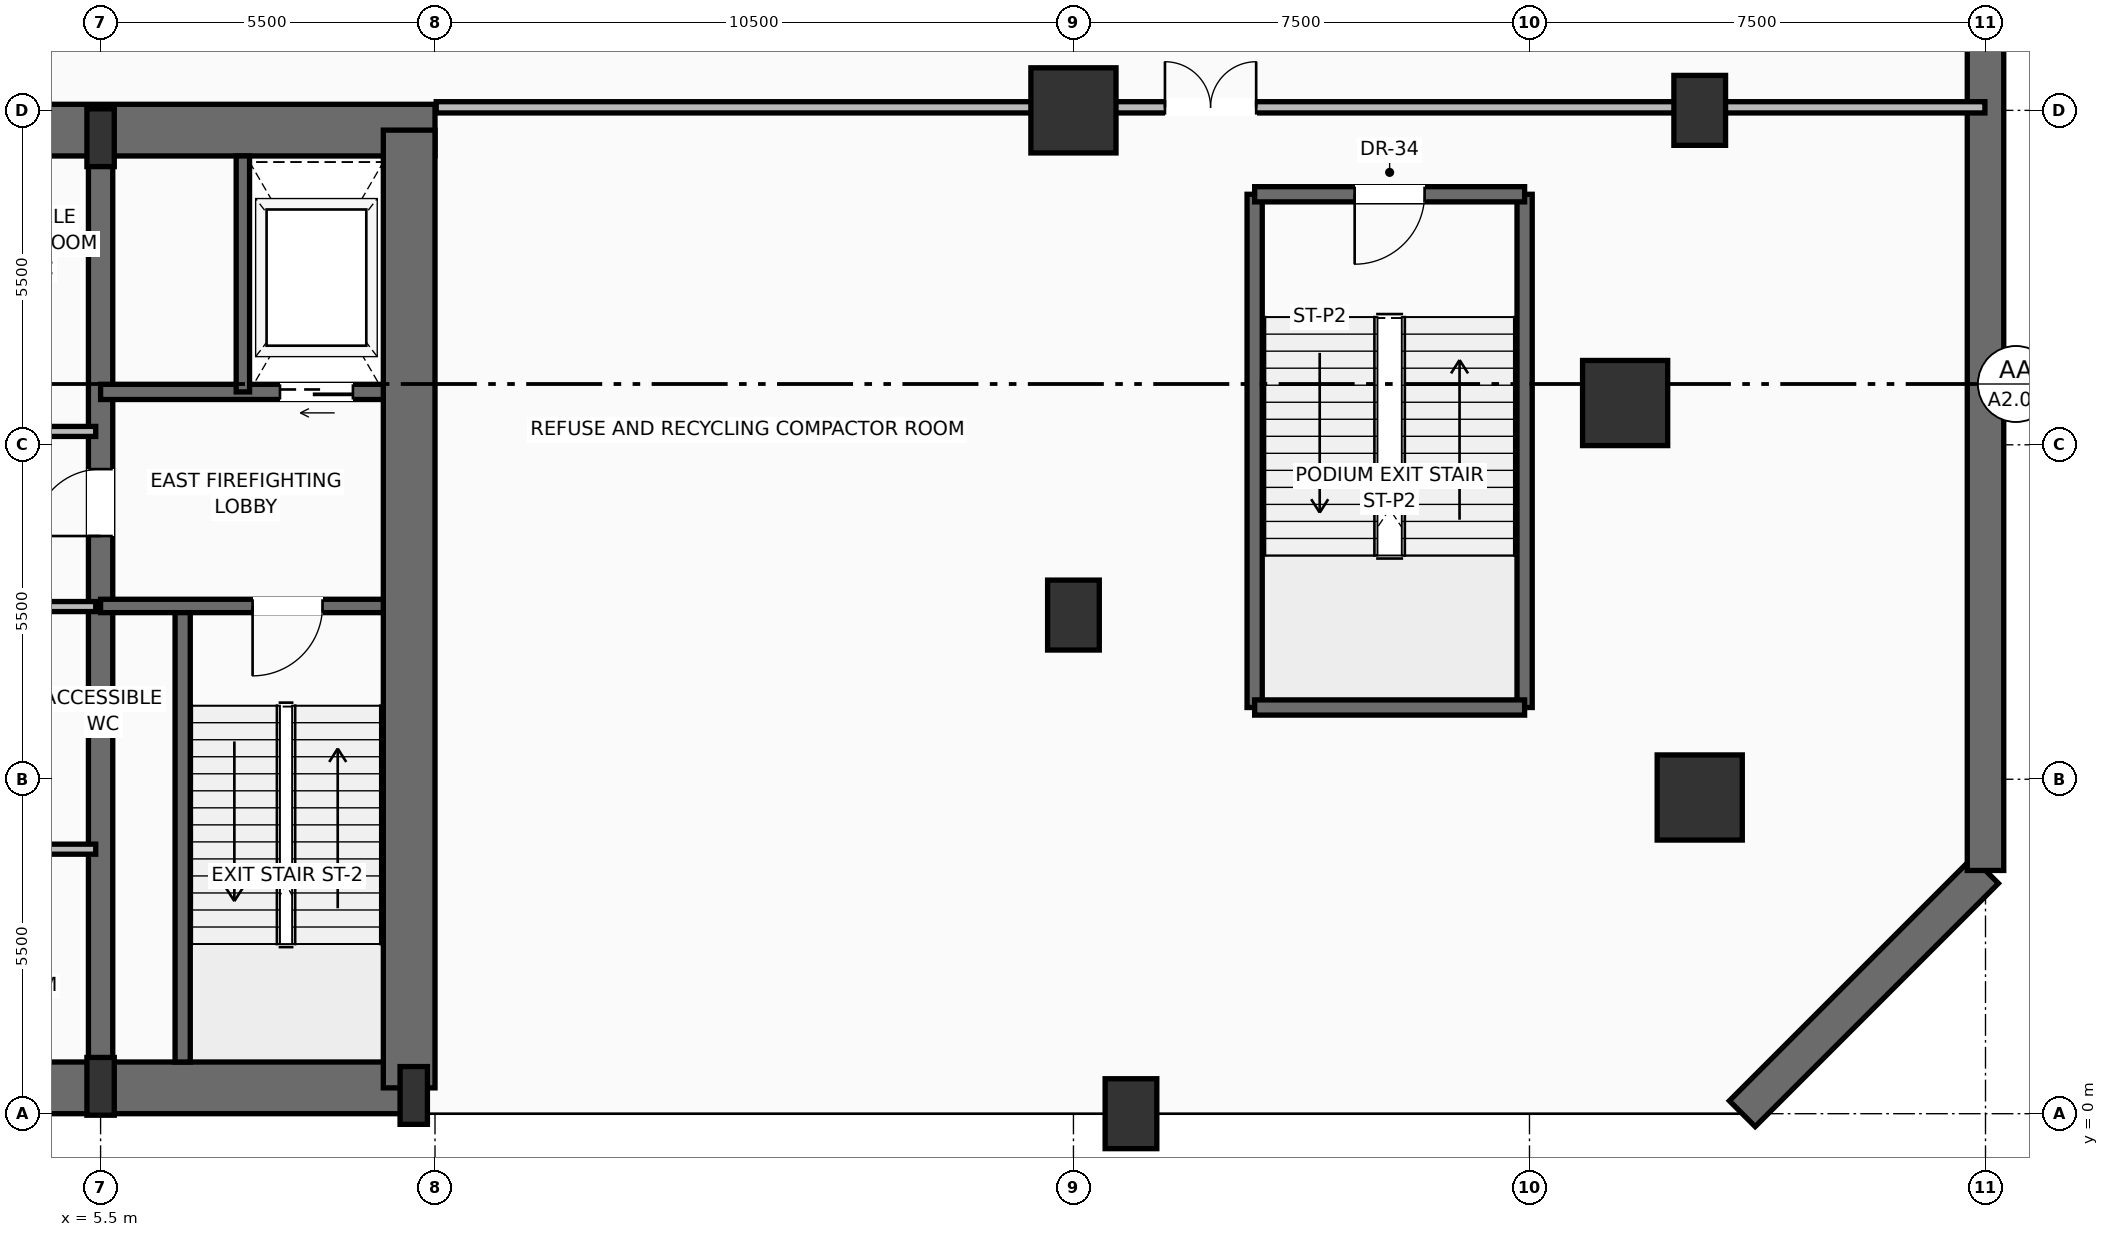
"""IFC4 building model, lengths in metres.
Left out: names, types, materials, properties, quantities, classifications, styles, units other than length and angle.
Written with IfcOpenShell. Run it as: python <this file> out.ifc"""

import sys

from ifc_helpers import new_model, si_unit, direction, frame, frame_2d, origin, origin_2d, place, context, subcontext, project, spatial, rectangle, hollow_rectangle, extrude, source, transform, mapped, element, fill, save


model = new_model("IFC4")
c1 = context("Model", 3, precision=1e-05, world=origin(), true_north=direction((0.0, 1.0)))
c2 = subcontext(c1, "Body", "Model", "MODEL_VIEW")
j1 = project(units=[si_unit("LENGTHUNIT", "METRE"), si_unit("PLANEANGLEUNIT", "RADIAN")], contexts=[c1])
p1 = place(None, origin())
s1 = spatial("IfcSite", under=j1, at=p1, CompositionType="ELEMENT")
p2 = place(p1, origin())
s2 = spatial("IfcBuilding", under=s1, at=p2, CompositionType="ELEMENT")
p3 = place(p2, frame((0.0, 0.0, -5.0)))
s3 = spatial("IfcBuildingStorey", under=s2, at=p3, CompositionType="ELEMENT", Elevation=-5.0)
p4 = place(p3, frame((32.5, 0.0, 0.0), z_axis=(0.0, 0.0, 1.0), x_axis=(0.707106781187, 0.707106781187, 0.0)))
e1 = element("IfcWall", 1, at=p4, inside=s3, PredefinedType="SOLIDWALL", context=c2, shape_type="SweptSolid", body=[
    extrude(rectangle(XDim=5.657, YDim=0.6, at=frame_2d((2.828, 0.0))), origin(), (0.0, 0.0, 1.0), 4.64),
])
p5 = place(p3, frame((36.5, 4.0, 0.0), z_axis=(0.0, 0.0, 1.0), x_axis=(0.0, 1.0, 0.0)))
e2 = element("IfcWall", 2, at=p5, inside=s3, PredefinedType="SOLIDWALL", context=c2, shape_type="SweptSolid", body=[
    extrude(rectangle(XDim=42.0, YDim=0.6, at=frame_2d((21.0, 0.0))), origin(), (0.0, 0.0, 1.0), 4.64),
])
p6 = place(p3, frame((-10.65, 0.425, 0.0), z_axis=(0.0, 0.0, 1.0), x_axis=(1.0, 0.0, 0.0)))
e3 = element("IfcWall", 3, at=p6, inside=s3, PredefinedType="SHEAR", context=c2, shape_type="SweptSolid", body=[
    extrude(rectangle(XDim=21.3, YDim=0.85, at=frame_2d((10.65, 0.0))), origin(), (0.0, 0.0, 1.0), 4.64),
])
p7 = place(p3, frame((-11.0, 16.175, 0.0), z_axis=(0.0, 0.0, 1.0), x_axis=(1.0, 0.0, 0.0)))
e4 = element("IfcWall", 4, at=p7, inside=s3, PredefinedType="SHEAR", context=c2, shape_type="SweptSolid", body=[
    extrude(rectangle(XDim=22.0, YDim=0.85, at=frame_2d((11.0, 0.0))), origin(), (0.0, 0.0, 1.0), 4.64),
])
p8 = place(p7, frame((3.57, 0.0, 0.0)))
e5 = element("IfcOpeningElement", 5, at=p8, cuts=e4, PredefinedType="OPENING", context=c2, shape_type="SweptSolid", body=[
    extrude(rectangle(XDim=1.3, YDim=2.3, at=frame_2d((0.65, 1.15))), frame((0.0, 0.435, 0.0), z_axis=(0.0, -1.0, 0.0), x_axis=(1.0, 0.0, 0.0)), (0.0, 0.0, 1.0), 0.87),
])
p9 = place(p7, frame((10.0, 0.0, 0.0)))
e6 = element("IfcOpeningElement", 6, at=p9, cuts=e4, PredefinedType="OPENING", context=c2, shape_type="SweptSolid", body=[
    extrude(rectangle(XDim=2.0, YDim=2.4, at=frame_2d((1.0, 1.2))), frame((0.0, 0.435, 0.0), z_axis=(0.0, -1.0, 0.0), x_axis=(1.0, 0.0, 0.0)), (0.0, 0.0, 1.0), 0.87),
])
p10 = place(p3, frame((10.575, 0.425, 0.0), z_axis=(0.0, 0.0, 1.0), x_axis=(0.0, 1.0, 0.0)))
e7 = element("IfcWall", 7, at=p10, inside=s3, PredefinedType="SHEAR", context=c2, shape_type="SweptSolid", body=[
    extrude(rectangle(XDim=15.75, YDim=0.85, at=frame_2d((7.875, 0.0))), origin(), (0.0, 0.0, 1.0), 4.64),
])
p11 = place(p3, frame((5.5, 0.425, 0.0), z_axis=(0.0, 0.0, 1.0), x_axis=(0.0, 1.0, 0.0)))
e8 = element("IfcWall", 8, at=p11, inside=s3, PredefinedType="SHEAR", context=c2, shape_type="SweptSolid", body=[
    extrude(rectangle(XDim=15.75, YDim=0.4, at=frame_2d((7.875, 0.0))), origin(), (0.0, 0.0, 1.0), 4.64),
])
p12 = place(p11, frame((9.075, 0.0, 0.0)))
e9 = element("IfcOpeningElement", 9, at=p12, cuts=e8, PredefinedType="OPENING", context=c2, shape_type="SweptSolid", body=[
    extrude(rectangle(XDim=1.1, YDim=2.2, at=frame_2d((0.55, 1.1))), frame((0.0, 0.21, 0.0), z_axis=(0.0, -1.0, 0.0), x_axis=(1.0, 0.0, 0.0)), (0.0, 0.0, 1.0), 0.42),
])
m1 = source(origin(), c2, "Body", "SweptSolid", [
    extrude(rectangle(XDim=0.45, YDim=0.95, at=origin_2d()), origin(), (0.0, 0.0, 1.0), 5.0),
])
for number, where, z_axis, x_axis in (
    (10, (5.5, 0.45, 0.0), (0.0, 0.0, 1.0), (1.0, 0.0, 0.0)),
    (11, (10.65, 0.3, 0.0), (0.0, 0.0, 1.0), (1.0, 0.0, 0.0)),
    (12, (5.5, 16.05, 0.0), (0.0, 0.0, 1.0), (1.0, 0.0, 0.0)),
):
    element("IfcColumn", number, at=place(p3, frame(where, z_axis=z_axis, x_axis=x_axis)), inside=s3, PredefinedType="PILASTER", context=c2, shape_type="MappedRepresentation", body=[
        mapped(m1, transform((0.0, 0.0, 0.0), scale=1.0)),
    ])
m2 = source(origin(), c2, "Body", "SweptSolid", [
    extrude(rectangle(XDim=0.85, YDim=1.15, at=origin_2d()), origin(), (0.0, 0.0, 1.0), 5.0),
])
for number, where, z_axis, x_axis in (
    (13, (22.446, 0.0, 0.0), (0.0, 0.0, 1.0), (1.0, 0.0, 0.0)),
    (14, (21.5, 8.2, 0.0), (0.0, 0.0, 1.0), (1.0, 0.0, 0.0)),
    (15, (31.8, 16.5, 0.0), (0.0, 0.0, 1.0), (1.0, 0.0, 0.0)),
):
    element("IfcColumn", number, at=place(p3, frame(where, z_axis=z_axis, x_axis=x_axis)), inside=s3, PredefinedType="COLUMN", context=c2, shape_type="MappedRepresentation", body=[
        mapped(m2, transform((0.0, 0.0, 0.0), scale=1.0)),
    ])
m3 = source(origin(), c2, "Body", "SweptSolid", [
    extrude(hollow_rectangle(XDim=1.4, YDim=1.4, WallThickness=0.07, at=origin_2d()), origin(), (0.0, 0.0, 1.0), 5.0),
])
for number, where, z_axis, x_axis in (
    (16, (21.5, 16.5, 0.0), (0.0, 0.0, 1.0), (1.0, 0.0, 0.0)),
    (17, (31.8, 5.2, 0.0), (0.0, 0.0, 1.0), (1.0, 0.0, 0.0)),
    (18, (30.573, 11.687, 0.0), (0.0, 0.0, 1.0), (1.0, 0.0, 0.0)),
):
    element("IfcColumn", number, at=place(p3, frame(where, z_axis=z_axis, x_axis=x_axis)), inside=s3, PredefinedType="COLUMN", context=c2, shape_type="MappedRepresentation", body=[
        mapped(m3, transform((0.0, 0.0, 0.0), scale=1.0)),
    ])
p13 = place(p3, frame((6.85, 0.85, 0.0), z_axis=(0.0, 0.0, 1.0), x_axis=(0.0, 1.0, 0.0)))
e19 = element("IfcWall", 19, at=p13, inside=s3, PredefinedType="SOLIDWALL", context=c2, shape_type="SweptSolid", body=[
    extrude(rectangle(XDim=7.5, YDim=0.25, at=frame_2d((3.75, 0.0))), origin(), (0.0, 0.0, 1.0), 4.64),
])
p14 = place(p3, frame((10.15, 8.35, 0.0), z_axis=(0.0, 0.0, 1.0), x_axis=(-1.0, 0.0, 0.0)))
e20 = element("IfcWall", 20, at=p14, inside=s3, PredefinedType="SOLIDWALL", context=c2, shape_type="SweptSolid", body=[
    extrude(rectangle(XDim=4.65, YDim=0.22, at=frame_2d((2.325, 0.0))), origin(), (0.0, 0.0, 1.0), 4.64),
])
p15 = place(p14, frame((1.0, 0.0, 0.0)))
e21 = element("IfcOpeningElement", 21, at=p15, cuts=e20, PredefinedType="OPENING", context=c2, shape_type="SweptSolid", body=[
    extrude(rectangle(XDim=1.15, YDim=2.2, at=frame_2d((0.575, 1.1))), frame((0.0, 0.12, 0.0), z_axis=(0.0, -1.0, 0.0), x_axis=(1.0, 0.0, 0.0)), (0.0, 0.0, 1.0), 0.24),
])
p16 = place(p3, frame((10.15, 11.87, 0.0), z_axis=(0.0, 0.0, 1.0), x_axis=(-1.0, 0.0, 0.0)))
e22 = element("IfcWall", 22, at=p16, inside=s3, PredefinedType="SOLIDWALL", context=c2, shape_type="SweptSolid", body=[
    extrude(rectangle(XDim=4.65, YDim=0.25, at=frame_2d((2.325, 0.0))), origin(), (0.0, 0.0, 1.0), 4.64),
])
p17 = place(p16, frame((0.5, 0.0, 0.0)))
e23 = element("IfcOpeningElement", 23, at=p17, cuts=e22, PredefinedType="OPENING", context=c2, shape_type="SweptSolid", body=[
    extrude(rectangle(XDim=1.2, YDim=2.25, at=frame_2d((0.6, 1.125))), frame((0.0, 0.135, 0.0), z_axis=(0.0, -1.0, 0.0), x_axis=(1.0, 0.0, 0.0)), (0.0, 0.0, 1.0), 0.27),
])
p18 = place(p3, frame((7.84, 11.87, 0.0), z_axis=(0.0, 0.0, 1.0), x_axis=(0.0, 1.0, 0.0)))
e24 = element("IfcWall", 24, at=p18, inside=s3, PredefinedType="SOLIDWALL", context=c2, shape_type="SweptSolid", body=[
    extrude(rectangle(XDim=3.88, YDim=0.22, at=frame_2d((1.94, 0.0))), origin(), (0.0, 0.0, 1.0), 4.64),
])
p19 = place(p3, frame((3.54, 8.34, 0.0), z_axis=(0.0, 0.0, 1.0), x_axis=(1.0, 0.0, 0.0)))
e25 = element("IfcWall", 25, at=p19, inside=s3, PredefinedType="PARTITIONING", context=c2, shape_type="SweptSolid", body=[
    extrude(rectangle(XDim=1.88, YDim=0.165, at=frame_2d((0.94, 0.0))), origin(), (0.0, 0.0, 1.0), 4.632),
])
p20 = place(p3, frame((1.8, 4.35, 0.0), z_axis=(0.0, 0.0, 1.0), x_axis=(1.0, 0.0, 0.0)))
e26 = element("IfcWall", 26, at=p20, inside=s3, PredefinedType="PARTITIONING", context=c2, shape_type="SweptSolid", body=[
    extrude(rectangle(XDim=3.62, YDim=0.165, at=frame_2d((1.81, 0.0))), origin(), (0.0, 0.0, 1.0), 4.632),
])
p21 = place(p20, frame((0.48, 0.0, 0.0)))
e27 = element("IfcOpeningElement", 27, at=p21, cuts=e26, PredefinedType="OPENING", context=c2, shape_type="SweptSolid", body=[
    extrude(rectangle(XDim=0.9, YDim=2.1, at=frame_2d((0.45, 1.05))), frame((0.0, 0.093, 0.0), z_axis=(0.0, -1.0, 0.0), x_axis=(1.0, 0.0, 0.0)), (0.0, 0.0, 1.0), 0.185),
])
p22 = place(p3, frame((3.54, 11.22, 0.0), z_axis=(0.0, 0.0, 1.0), x_axis=(1.0, 0.0, 0.0)))
e28 = element("IfcWall", 28, at=p22, inside=s3, PredefinedType="PARTITIONING", context=c2, shape_type="SweptSolid", body=[
    extrude(rectangle(XDim=1.88, YDim=0.165, at=frame_2d((0.94, 0.0))), origin(), (0.0, 0.0, 1.0), 4.632),
])
for number, where, z_axis, x_axis in (
    (29, (24.48, 6.68, 0.0), (0.0, 0.0, 1.0), (0.0, 1.0, 0.0)),
    (30, (28.92, 6.68, 0.0), (0.0, 0.0, 1.0), (0.0, 1.0, 0.0)),
):
    element("IfcWall", number, at=place(p3, frame(where, z_axis=z_axis, x_axis=x_axis)), inside=s3, PredefinedType="SOLIDWALL", context=c2, shape_type="SweptSolid", body=[
        extrude(rectangle(XDim=8.44, YDim=0.25, at=frame_2d((4.22, 0.0))), origin(), (0.0, 0.0, 1.0), 4.64),
    ])
p23 = place(p3, frame((24.48, 6.68, 0.0), z_axis=(0.0, 0.0, 1.0), x_axis=(1.0, 0.0, 0.0)))
e31 = element("IfcWall", 31, at=p23, inside=s3, PredefinedType="SOLIDWALL", context=c2, shape_type="SweptSolid", body=[
    extrude(rectangle(XDim=4.44, YDim=0.25, at=frame_2d((2.22, 0.0))), origin(), (0.0, 0.0, 1.0), 4.64),
])
p24 = place(p3, frame((28.92, 15.12, 0.0), z_axis=(0.0, 0.0, 1.0), x_axis=(-1.0, 0.0, 0.0)))
e32 = element("IfcWall", 32, at=p24, inside=s3, PredefinedType="SOLIDWALL", context=c2, shape_type="SweptSolid", body=[
    extrude(rectangle(XDim=4.44, YDim=0.25, at=frame_2d((2.22, 0.0))), origin(), (0.0, 0.0, 1.0), 4.64),
])
p25 = place(p24, frame((1.645, 0.0, 0.0)))
e33 = element("IfcOpeningElement", 33, at=p25, cuts=e32, PredefinedType="OPENING", context=c2, shape_type="SweptSolid", body=[
    extrude(rectangle(XDim=1.15, YDim=2.2, at=frame_2d((0.575, 1.1))), frame((0.0, 0.135, 0.0), z_axis=(0.0, -1.0, 0.0), x_axis=(1.0, 0.0, 0.0)), (0.0, 0.0, 1.0), 0.27),
])
p26 = place(p3, frame((11.02, 16.55, 0.0), z_axis=(0.0, 0.0, 1.0), x_axis=(1.0, 0.0, 0.0)))
e34 = element("IfcWall", 34, at=p26, inside=s3, PredefinedType="PARTITIONING", context=c2, shape_type="SweptSolid", body=[
    extrude(rectangle(XDim=25.47, YDim=0.185, at=frame_2d((12.735, 0.0))), origin(), (0.0, 0.0, 1.0), 3.592),
])
p27 = place(p26, frame((11.985, 0.0, 0.0)))
e35 = element("IfcOpeningElement", 35, at=p27, cuts=e34, PredefinedType="OPENING", context=c2, shape_type="SweptSolid", body=[
    extrude(rectangle(XDim=1.5, YDim=2.25, at=frame_2d((0.75, 1.125))), frame((0.0, 0.103, 0.0), z_axis=(0.0, -1.0, 0.0), x_axis=(1.0, 0.0, 0.0)), (0.0, 0.0, 1.0), 0.205),
])
m4 = source(origin(), c2, "Body", "SweptSolid", [
    extrude(rectangle(XDim=1.15, YDim=2.2, at=frame_2d((0.575, 1.1))), frame((0.0, 0.025, 0.0), z_axis=(0.0, -1.0, 0.0), x_axis=(1.0, 0.0, 0.0)), (0.0, 0.0, 1.0), 0.05),
])
p28 = place(p15, origin())
e36 = element("IfcDoor", 36, at=p28, inside=s3, OperationType="SINGLE_SWING_RIGHT", PredefinedType="DOOR", context=c2, shape_type="MappedRepresentation", body=[
    mapped(m4, transform((0.0, 0.0, 0.0), scale=1.0)),
])
fill(e21, e36)
m5 = source(origin(), c2, "Body", "SweptSolid", [
    extrude(rectangle(XDim=1.1, YDim=2.2, at=frame_2d((0.55, 1.1))), frame((0.0, 0.025, 0.0), z_axis=(0.0, -1.0, 0.0), x_axis=(1.0, 0.0, 0.0)), (0.0, 0.0, 1.0), 0.05),
])
p29 = place(p12, origin())
e37 = element("IfcDoor", 37, at=p29, inside=s3, OperationType="SINGLE_SWING_LEFT", PredefinedType="DOOR", context=c2, shape_type="MappedRepresentation", body=[
    mapped(m5, transform((0.0, 0.0, 0.0), scale=1.0)),
])
fill(e9, e37)
m6 = source(origin(), c2, "Body", "SweptSolid", [
    extrude(rectangle(XDim=1.2, YDim=2.25, at=frame_2d((0.6, 1.125))), frame((0.0, 0.025, 0.0), z_axis=(0.0, -1.0, 0.0), x_axis=(1.0, 0.0, 0.0)), (0.0, 0.0, 1.0), 0.05),
])
p30 = place(p17, origin())
e38 = element("IfcDoor", 38, at=p30, inside=s3, OperationType="SLIDING_TO_RIGHT", PredefinedType="DOOR", context=c2, shape_type="MappedRepresentation", body=[
    mapped(m6, transform((0.0, 0.0, 0.0), scale=1.0)),
])
fill(e23, e38)
p31 = place(p25, origin())
e39 = element("IfcDoor", 39, at=p31, inside=s3, OperationType="SINGLE_SWING_RIGHT", PredefinedType="DOOR", context=c2, shape_type="MappedRepresentation", body=[
    mapped(m4, transform((0.0, 0.0, 0.0), scale=1.0)),
])
fill(e33, e39)
m7 = source(origin(), c2, "Body", "SweptSolid", [
    extrude(rectangle(XDim=1.5, YDim=2.25, at=frame_2d((0.75, 1.125))), frame((0.0, 0.025, 0.0), z_axis=(0.0, -1.0, 0.0), x_axis=(1.0, 0.0, 0.0)), (0.0, 0.0, 1.0), 0.05),
])
p32 = place(p27, origin())
e40 = element("IfcDoor", 40, at=p32, inside=s3, OperationType="DOUBLE_DOOR_SINGLE_SWING", PredefinedType="DOOR", context=c2, shape_type="MappedRepresentation", body=[
    mapped(m7, transform((0.0, 0.0, 0.0), scale=1.0)),
])
fill(e35, e40)
save(model, sys.argv[1])
